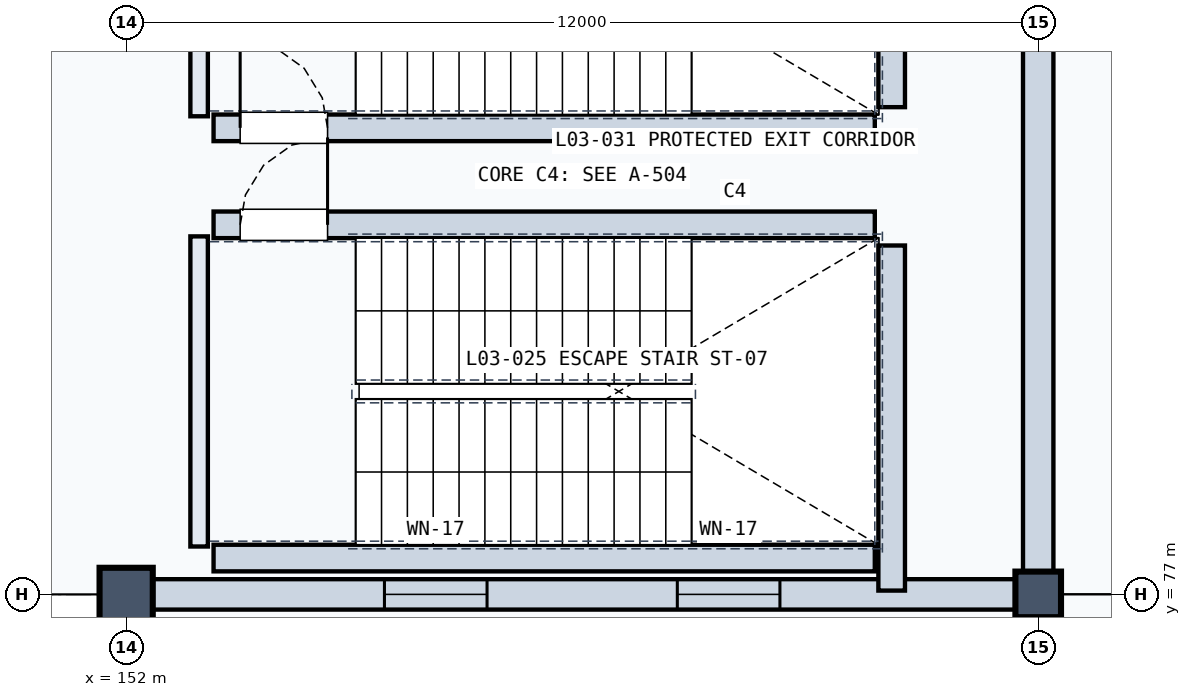
"""IFC4 building model, lengths in metres.
Left out: names, types, materials, properties, quantities, classifications, styles, units other than length and angle.
Written with IfcOpenShell. Run it as: python <this file> out.ifc"""

import sys

from ifc_helpers import new_model, si_unit, direction, frame, frame_2d, origin, origin_2d, place, context, subcontext, project, spatial, rectangle, extrude, element, fill, save


model = new_model("IFC4")
c1 = context("Model", 3, precision=1e-05, world=origin(), true_north=direction((0.0, 1.0)))
c2 = subcontext(c1, "Body", "Model", "MODEL_VIEW")
j1 = project(units=[si_unit("LENGTHUNIT", "METRE"), si_unit("PLANEANGLEUNIT", "RADIAN")], contexts=[c1])
p1 = place(None, origin())
s1 = spatial("IfcSite", under=j1, at=p1, CompositionType="ELEMENT")
p2 = place(p1, origin())
s2 = spatial("IfcBuilding", under=s1, at=p2, CompositionType="ELEMENT")
p3 = place(p2, frame((0.0, 0.0, 14.7)))
s3 = spatial("IfcBuildingStorey", under=s2, at=p3, CompositionType="ELEMENT", Elevation=14.7)
p4 = place(p3, frame((152.0, 77.0, 0.0), z_axis=(0.0, 0.0, 1.0), x_axis=(1.0, 0.0, 0.0)))
e1 = element("IfcColumn", 1, at=p4, inside=s3, PredefinedType="COLUMN", context=c2, shape_type="SweptSolid", body=[
    extrude(rectangle(XDim=0.7, YDim=0.7, at=origin_2d()), origin(), (0.0, 0.0, 1.0), 4.8),
])
p5 = place(p3, frame((164.0, 77.0, 0.0), z_axis=(0.0, 0.0, 1.0), x_axis=(1.0, 0.0, 0.0)))
e2 = element("IfcColumn", 2, at=p5, inside=s3, PredefinedType="COLUMN", context=c2, shape_type="SweptSolid", body=[
    extrude(rectangle(XDim=0.6, YDim=0.6, at=origin_2d()), origin(), (0.0, 0.0, 1.0), 4.8),
])
p6 = place(p3, frame((152.22, 77.0, 0.0), z_axis=(0.0, 0.0, 1.0), x_axis=(1.0, 0.0, 0.0)))
e3 = element("IfcWall", 3, at=p6, inside=s3, PredefinedType="SOLIDWALL", context=c2, shape_type="SweptSolid", body=[
    extrude(rectangle(XDim=11.56, YDim=0.4, at=frame_2d((5.78, 0.0))), origin(), (0.0, 0.0, 1.0), 3.59),
])
p7 = place(p6, frame((3.178, 0.0, 0.8)))
e4 = element("IfcOpeningElement", 4, at=p7, cuts=e3, PredefinedType="OPENING", context=c2, shape_type="SweptSolid", body=[
    extrude(rectangle(XDim=1.35, YDim=2.1, at=frame_2d((0.675, 1.05))), frame((0.0, 0.21, 0.0), z_axis=(0.0, -1.0, 0.0), x_axis=(1.0, 0.0, 0.0)), (0.0, 0.0, 1.0), 0.42),
])
p8 = place(p6, frame((7.032, 0.0, 0.8)))
e5 = element("IfcOpeningElement", 5, at=p8, cuts=e3, PredefinedType="OPENING", context=c2, shape_type="SweptSolid", body=[
    extrude(rectangle(XDim=1.35, YDim=2.1, at=frame_2d((0.675, 1.05))), frame((0.0, 0.21, 0.0), z_axis=(0.0, -1.0, 0.0), x_axis=(1.0, 0.0, 0.0)), (0.0, 0.0, 1.0), 0.42),
])
p9 = place(p3, frame((164.0, 77.22, 0.0), z_axis=(0.0, 0.0, 1.0), x_axis=(0.0, 1.0, 0.0)))
e6 = element("IfcWall", 6, at=p9, inside=s3, PredefinedType="SOLIDWALL", context=c2, shape_type="SweptSolid", body=[
    extrude(rectangle(XDim=10.56, YDim=0.4, at=frame_2d((5.28, 0.0))), origin(), (0.0, 0.0, 1.0), 3.79),
])
p10 = place(p3, frame((152.96, 77.63, 0.0), z_axis=(0.0, 0.0, 1.0), x_axis=(0.0, 1.0, 0.0)))
e7 = element("IfcWall", 7, at=p10, inside=s3, PredefinedType="SOLIDWALL", context=c2, shape_type="SweptSolid", body=[
    extrude(rectangle(XDim=4.08, YDim=0.23, at=frame_2d((2.04, 0.0))), origin(), (0.0, 0.0, 1.0), 4.46),
])
p11 = place(p3, frame((162.072, 77.05, 0.0), z_axis=(0.0, 0.0, 1.0), x_axis=(0.0, 1.0, 0.0)))
e8 = element("IfcWall", 8, at=p11, inside=s3, PredefinedType="SOLIDWALL", context=c2, shape_type="SweptSolid", body=[
    extrude(rectangle(XDim=4.54, YDim=0.35, at=frame_2d((2.27, 0.0))), origin(), (0.0, 0.0, 1.0), 4.46),
])
p12 = place(p3, frame((153.15, 77.478, 0.0), z_axis=(0.0, 0.0, 1.0), x_axis=(1.0, 0.0, 0.0)))
e9 = element("IfcWall", 9, at=p12, inside=s3, PredefinedType="SOLIDWALL", context=c2, shape_type="SweptSolid", body=[
    extrude(rectangle(XDim=8.7, YDim=0.35, at=frame_2d((4.35, 0.0))), origin(), (0.0, 0.0, 1.0), 4.46),
])
p13 = place(p3, frame((153.15, 81.862, 0.0), z_axis=(0.0, 0.0, 1.0), x_axis=(1.0, 0.0, 0.0)))
e10 = element("IfcWall", 10, at=p13, inside=s3, PredefinedType="SOLIDWALL", context=c2, shape_type="SweptSolid", body=[
    extrude(rectangle(XDim=8.7, YDim=0.35, at=frame_2d((4.35, 0.0))), origin(), (0.0, 0.0, 1.0), 4.46),
])
p14 = place(p13, frame((0.35, 0.0, 0.0)))
e11 = element("IfcOpeningElement", 11, at=p14, cuts=e10, PredefinedType="OPENING", context=c2, shape_type="SweptSolid", body=[
    extrude(rectangle(XDim=1.15, YDim=2.2, at=frame_2d((0.575, 1.1))), frame((0.0, 0.185, 0.0), z_axis=(0.0, -1.0, 0.0), x_axis=(1.0, 0.0, 0.0)), (0.0, 0.0, 1.0), 0.37),
])
p15 = place(p3, frame((152.96, 83.29, 0.0), z_axis=(0.0, 0.0, 1.0), x_axis=(0.0, 1.0, 0.0)))
e12 = element("IfcWall", 12, at=p15, inside=s3, PredefinedType="SOLIDWALL", context=c2, shape_type="SweptSolid", body=[
    extrude(rectangle(XDim=4.08, YDim=0.23, at=frame_2d((2.04, 0.0))), origin(), (0.0, 0.0, 1.0), 4.46),
])
p16 = place(p3, frame((162.072, 83.41, 0.0), z_axis=(0.0, 0.0, 1.0), x_axis=(0.0, 1.0, 0.0)))
e13 = element("IfcWall", 13, at=p16, inside=s3, PredefinedType="SOLIDWALL", context=c2, shape_type="SweptSolid", body=[
    extrude(rectangle(XDim=3.84, YDim=0.35, at=frame_2d((1.92, 0.0))), origin(), (0.0, 0.0, 1.0), 4.46),
])
p17 = place(p3, frame((153.15, 83.138, 0.0), z_axis=(0.0, 0.0, 1.0), x_axis=(1.0, 0.0, 0.0)))
e14 = element("IfcWall", 14, at=p17, inside=s3, PredefinedType="SOLIDWALL", context=c2, shape_type="SweptSolid", body=[
    extrude(rectangle(XDim=8.7, YDim=0.35, at=frame_2d((4.35, 0.0))), origin(), (0.0, 0.0, 1.0), 4.46),
])
p18 = place(p17, frame((0.35, 0.0, 0.0)))
e15 = element("IfcOpeningElement", 15, at=p18, cuts=e14, PredefinedType="OPENING", context=c2, shape_type="SweptSolid", body=[
    extrude(rectangle(XDim=1.15, YDim=2.2, at=frame_2d((0.575, 1.1))), frame((0.0, 0.185, 0.0), z_axis=(0.0, -1.0, 0.0), x_axis=(1.0, 0.0, 0.0)), (0.0, 0.0, 1.0), 0.37),
])
p19 = place(p7, origin())
e16 = element("IfcWindow", 16, at=p19, inside=s3, PartitioningType="SINGLE_PANEL", PredefinedType="WINDOW", context=c2, shape_type="SweptSolid", body=[
    extrude(rectangle(XDim=1.35, YDim=2.1, at=frame_2d((0.675, 1.05))), frame((0.0, 0.03, 0.0), z_axis=(0.0, -1.0, 0.0), x_axis=(1.0, 0.0, 0.0)), (0.0, 0.0, 1.0), 0.06),
])
fill(e4, e16)
p20 = place(p8, origin())
e17 = element("IfcWindow", 17, at=p20, inside=s3, PartitioningType="SINGLE_PANEL", PredefinedType="WINDOW", context=c2, shape_type="SweptSolid", body=[
    extrude(rectangle(XDim=1.35, YDim=2.1, at=frame_2d((0.675, 1.05))), frame((0.0, 0.03, 0.0), z_axis=(0.0, -1.0, 0.0), x_axis=(1.0, 0.0, 0.0)), (0.0, 0.0, 1.0), 0.06),
])
fill(e5, e17)
p21 = place(p14, origin())
e18 = element("IfcDoor", 18, at=p21, inside=s3, OperationType="SINGLE_SWING_RIGHT", PredefinedType="DOOR", context=c2, shape_type="SweptSolid", body=[
    extrude(rectangle(XDim=1.15, YDim=2.2, at=frame_2d((0.575, 1.1))), frame((0.0, 0.025, 0.0), z_axis=(0.0, -1.0, 0.0), x_axis=(1.0, 0.0, 0.0)), (0.0, 0.0, 1.0), 0.05),
])
fill(e11, e18)
p22 = place(p18, origin())
e19 = element("IfcDoor", 19, at=p22, inside=s3, OperationType="SINGLE_SWING_LEFT", PredefinedType="DOOR", context=c2, shape_type="SweptSolid", body=[
    extrude(rectangle(XDim=1.15, YDim=2.2, at=frame_2d((0.575, 1.1))), frame((0.0, 0.025, 0.0), z_axis=(0.0, -1.0, 0.0), x_axis=(1.0, 0.0, 0.0)), (0.0, 0.0, 1.0), 0.05),
])
fill(e15, e19)
save(model, sys.argv[1])
